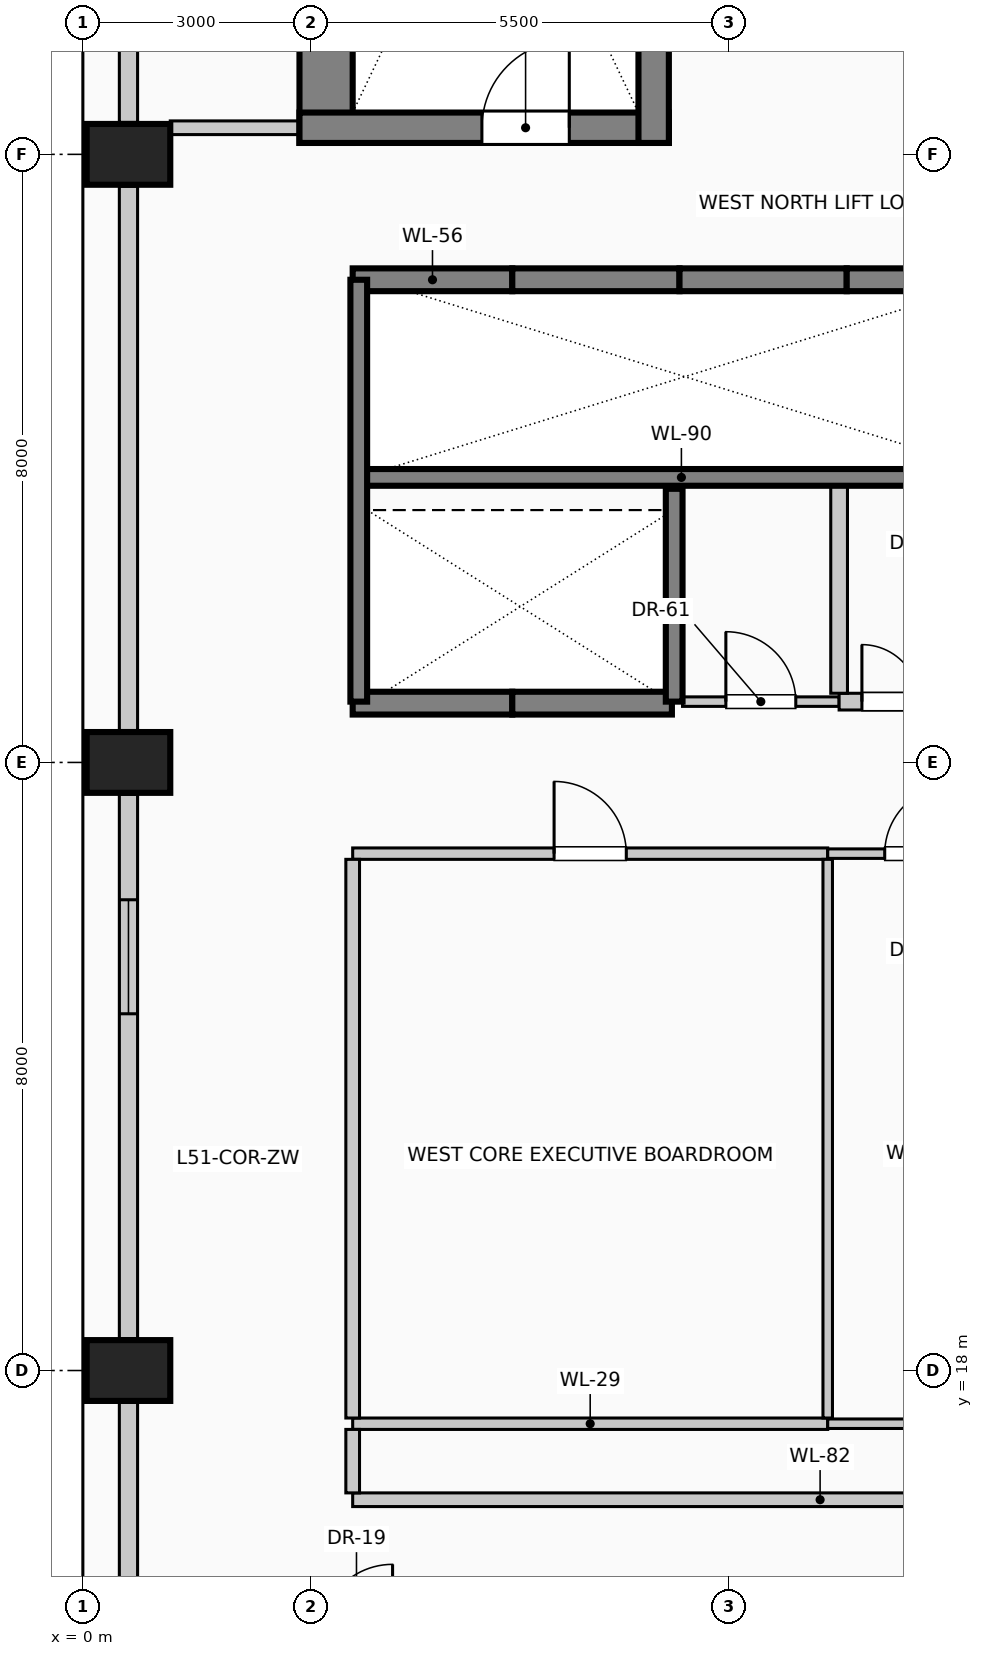
"""IFC4 building model, lengths in metres.
Left out: names, types, materials, properties, quantities, classifications, styles, units other than length and angle.
Written with IfcOpenShell. Run it as: python <this file> out.ifc"""

import sys

from ifc_helpers import new_model, si_unit, direction, frame, frame_2d, origin, origin_2d, place, context, subcontext, project, spatial, rectangle, extrude, element, fill, save


model = new_model("IFC4")
c1 = context("Model", 3, precision=1e-05, world=origin(), true_north=direction((0.0, 1.0)))
c2 = subcontext(c1, "Body", "Model", "MODEL_VIEW")
j1 = project(units=[si_unit("LENGTHUNIT", "METRE"), si_unit("PLANEANGLEUNIT", "RADIAN")], contexts=[c1])
p1 = place(None, origin())
s1 = spatial("IfcSite", under=j1, at=p1, CompositionType="ELEMENT")
p2 = place(p1, origin())
s2 = spatial("IfcBuilding", under=s1, at=p2, CompositionType="ELEMENT")
p3 = place(p2, frame((0.0, 0.0, 210.6)))
s3 = spatial("IfcBuildingStorey", under=s2, at=p3, CompositionType="ELEMENT", Elevation=210.6)
p4 = place(p3, frame((3.2, 34.15, 0.0), z_axis=(0.0, 0.0, 1.0), x_axis=(0.0, 1.0, 0.0)))
e1 = element("IfcWall", 1, at=p4, inside=s3, PredefinedType="SHEAR", context=c2, shape_type="SweptSolid", body=[
    extrude(rectangle(XDim=8.98, YDim=0.7, at=frame_2d((4.49, 0.0))), origin(), (0.0, 0.0, 1.0), 4.0),
])
p5 = place(p3, frame((2.85, 34.35, 0.0), z_axis=(0.0, 0.0, 1.0), x_axis=(1.0, 0.0, 0.0)))
e2 = element("IfcWall", 2, at=p5, inside=s3, PredefinedType="SHEAR", context=c2, shape_type="SweptSolid", body=[
    extrude(rectangle(XDim=4.86, YDim=0.4, at=frame_2d((2.43, 0.0))), origin(), (0.0, 0.0, 1.0), 4.0),
])
p6 = place(p5, frame((2.4, 0.0, 0.0)))
e3 = element("IfcOpeningElement", 3, at=p6, cuts=e2, PredefinedType="OPENING", context=c2, shape_type="SweptSolid", body=[
    extrude(rectangle(XDim=1.15, YDim=2.2, at=frame_2d((0.575, 1.1))), frame((0.0, 0.21, 0.0), z_axis=(0.0, -1.0, 0.0), x_axis=(1.0, 0.0, 0.0)), (0.0, 0.0, 1.0), 0.42),
])
p7 = place(p3, frame((7.51, 34.15, 0.0), z_axis=(0.0, 0.0, 1.0), x_axis=(0.0, 1.0, 0.0)))
e4 = element("IfcWall", 4, at=p7, inside=s3, PredefinedType="SHEAR", context=c2, shape_type="SweptSolid", body=[
    extrude(rectangle(XDim=8.98, YDim=0.4, at=frame_2d((4.49, 0.0))), origin(), (0.0, 0.0, 1.0), 4.0),
])
for number, where, z_axis, x_axis in (
    (5, (0.6, 18.0, 0.0), (0.0, 0.0, 1.0), (0.0, 1.0, 0.0)),
    (6, (0.6, 26.0, 0.0), (0.0, 0.0, 1.0), (0.0, 1.0, 0.0)),
    (7, (0.6, 34.0, 0.0), (0.0, 0.0, 1.0), (0.0, 1.0, 0.0)),
):
    element("IfcColumn", number, at=place(p3, frame(where, z_axis=z_axis, x_axis=x_axis)), inside=s3, PredefinedType="COLUMN", context=c2, shape_type="SweptSolid", body=[
        extrude(rectangle(XDim=0.8, YDim=1.1, at=origin_2d()), origin(), (0.0, 0.0, 1.0), 4.0),
    ])
p8 = place(p3, frame((0.6, 10.42, 0.0), z_axis=(0.0, 0.0, 1.0), x_axis=(0.0, 1.0, 0.0)))
e8 = element("IfcWall", 8, at=p8, inside=s3, PredefinedType="SOLIDWALL", context=c2, shape_type="SweptSolid", body=[
    extrude(rectangle(XDim=7.16, YDim=0.24, at=frame_2d((3.58, 0.0))), origin(), (0.0, 0.0, 1.0), 3.0),
])
p9 = place(p8, frame((1.387, 0.0, 0.42)))
e9 = element("IfcOpeningElement", 9, at=p9, cuts=e8, PredefinedType="OPENING", context=c2, shape_type="SweptSolid", body=[
    extrude(rectangle(XDim=1.5, YDim=2.2, at=frame_2d((0.75, 1.1))), frame((0.0, 0.13, 0.0), z_axis=(0.0, -1.0, 0.0), x_axis=(1.0, 0.0, 0.0)), (0.0, 0.0, 1.0), 0.26),
])
p10 = place(p3, frame((0.6, 18.42, 0.0), z_axis=(0.0, 0.0, 1.0), x_axis=(0.0, 1.0, 0.0)))
e10 = element("IfcWall", 10, at=p10, inside=s3, PredefinedType="SOLIDWALL", context=c2, shape_type="SweptSolid", body=[
    extrude(rectangle(XDim=7.16, YDim=0.24, at=frame_2d((3.58, 0.0))), origin(), (0.0, 0.0, 1.0), 3.0),
])
p11 = place(p10, frame((4.273, 0.0, 0.42)))
e11 = element("IfcOpeningElement", 11, at=p11, cuts=e10, PredefinedType="OPENING", context=c2, shape_type="SweptSolid", body=[
    extrude(rectangle(XDim=1.5, YDim=2.2, at=frame_2d((0.75, 1.1))), frame((0.0, 0.13, 0.0), z_axis=(0.0, -1.0, 0.0), x_axis=(1.0, 0.0, 0.0)), (0.0, 0.0, 1.0), 0.26),
])
p12 = place(p3, frame((0.6, 26.42, 0.0), z_axis=(0.0, 0.0, 1.0), x_axis=(0.0, 1.0, 0.0)))
e12 = element("IfcWall", 12, at=p12, inside=s3, PredefinedType="SOLIDWALL", context=c2, shape_type="SweptSolid", body=[
    extrude(rectangle(XDim=7.16, YDim=0.24, at=frame_2d((3.58, 0.0))), origin(), (0.0, 0.0, 1.0), 3.0),
])
p13 = place(p3, frame((0.6, 34.42, 0.0), z_axis=(0.0, 0.0, 1.0), x_axis=(0.0, 1.0, 0.0)))
e13 = element("IfcWall", 13, at=p13, inside=s3, PredefinedType="SOLIDWALL", context=c2, shape_type="SweptSolid", body=[
    extrude(rectangle(XDim=7.56, YDim=0.24, at=frame_2d((3.78, 0.0))), origin(), (0.0, 0.0, 1.0), 3.0),
])
p14 = place(p3, frame((3.55, 32.35, 0.0), z_axis=(0.0, 0.0, 1.0), x_axis=(1.0, 0.0, 0.0)))
e14 = element("IfcWall", 14, at=p14, inside=s3, PredefinedType="SOLIDWALL", context=c2, shape_type="SweptSolid", body=[
    extrude(rectangle(XDim=2.1, YDim=0.3, at=frame_2d((1.05, 0.0))), origin(), (0.0, 0.0, 1.0), 4.0),
])
p15 = place(p3, frame((5.65, 32.35, 0.0), z_axis=(0.0, 0.0, 1.0), x_axis=(1.0, 0.0, 0.0)))
e15 = element("IfcWall", 15, at=p15, inside=s3, PredefinedType="SOLIDWALL", context=c2, shape_type="SweptSolid", body=[
    extrude(rectangle(XDim=2.2, YDim=0.3, at=frame_2d((1.1, 0.0))), origin(), (0.0, 0.0, 1.0), 4.0),
])
p16 = place(p3, frame((7.85, 32.35, 0.0), z_axis=(0.0, 0.0, 1.0), x_axis=(1.0, 0.0, 0.0)))
e16 = element("IfcWall", 16, at=p16, inside=s3, PredefinedType="SOLIDWALL", context=c2, shape_type="SweptSolid", body=[
    extrude(rectangle(XDim=2.2, YDim=0.3, at=frame_2d((1.1, 0.0))), origin(), (0.0, 0.0, 1.0), 4.0),
])
p17 = place(p3, frame((10.05, 32.35, 0.0), z_axis=(0.0, 0.0, 1.0), x_axis=(1.0, 0.0, 0.0)))
e17 = element("IfcWall", 17, at=p17, inside=s3, PredefinedType="SOLIDWALL", context=c2, shape_type="SweptSolid", body=[
    extrude(rectangle(XDim=2.15, YDim=0.3, at=frame_2d((1.075, 0.0))), origin(), (0.0, 0.0, 1.0), 4.0),
])
p18 = place(p3, frame((5.65, 26.78, 0.0), z_axis=(0.0, 0.0, 1.0), x_axis=(-1.0, 0.0, 0.0)))
e18 = element("IfcWall", 18, at=p18, inside=s3, PredefinedType="SOLIDWALL", context=c2, shape_type="SweptSolid", body=[
    extrude(rectangle(XDim=2.1, YDim=0.3, at=frame_2d((1.05, 0.0))), origin(), (0.0, 0.0, 1.0), 4.0),
])
p19 = place(p3, frame((7.75, 26.78, 0.0), z_axis=(0.0, 0.0, 1.0), x_axis=(-1.0, 0.0, 0.0)))
e19 = element("IfcWall", 19, at=p19, inside=s3, PredefinedType="SOLIDWALL", context=c2, shape_type="SweptSolid", body=[
    extrude(rectangle(XDim=2.1, YDim=0.3, at=frame_2d((1.05, 0.0))), origin(), (0.0, 0.0, 1.0), 4.0),
])
p20 = place(p3, frame((3.55, 29.75, 0.0), z_axis=(0.0, 0.0, 1.0), x_axis=(1.0, 0.0, 0.0)))
e20 = element("IfcWall", 20, at=p20, inside=s3, PredefinedType="SOLIDWALL", context=c2, shape_type="SweptSolid", body=[
    extrude(rectangle(XDim=8.65, YDim=0.22, at=frame_2d((4.325, 0.0))), origin(), (0.0, 0.0, 1.0), 4.0),
])
p21 = place(p3, frame((3.63, 26.8, 0.0), z_axis=(0.0, 0.0, 1.0), x_axis=(0.0, 1.0, 0.0)))
e21 = element("IfcWall", 21, at=p21, inside=s3, PredefinedType="SOLIDWALL", context=c2, shape_type="SweptSolid", body=[
    extrude(rectangle(XDim=5.55, YDim=0.22, at=frame_2d((2.775, 0.0))), origin(), (0.0, 0.0, 1.0), 4.0),
])
p22 = place(p3, frame((7.78, 26.8, 0.0), z_axis=(0.0, 0.0, 1.0), x_axis=(0.0, 1.0, 0.0)))
e22 = element("IfcWall", 22, at=p22, inside=s3, PredefinedType="SOLIDWALL", context=c2, shape_type="SweptSolid", body=[
    extrude(rectangle(XDim=2.8, YDim=0.22, at=frame_2d((1.4, 0.0))), origin(), (0.0, 0.0, 1.0), 4.0),
])
p23 = place(p3, frame((3.55, 16.3, 0.0), z_axis=(0.0, 0.0, 1.0), x_axis=(1.0, 0.0, 0.0)))
e23 = element("IfcWall", 23, at=p23, inside=s3, PredefinedType="PARTITIONING", context=c2, shape_type="SweptSolid", body=[
    extrude(rectangle(XDim=12.3, YDim=0.18, at=frame_2d((6.15, 0.0))), origin(), (0.0, 0.0, 1.0), 3.75),
])
p24 = place(p3, frame((3.55, 17.3, 0.0), z_axis=(0.0, 0.0, 1.0), x_axis=(1.0, 0.0, 0.0)))
e24 = element("IfcWall", 24, at=p24, inside=s3, PredefinedType="PARTITIONING", context=c2, shape_type="SweptSolid", body=[
    extrude(rectangle(XDim=6.25, YDim=0.15, at=frame_2d((3.125, 0.0))), origin(), (0.0, 0.0, 1.0), 3.75),
])
p25 = place(p3, frame((9.8, 17.3, 0.0), z_axis=(0.0, 0.0, 1.0), x_axis=(1.0, 0.0, 0.0)))
e25 = element("IfcWall", 25, at=p25, inside=s3, PredefinedType="PARTITIONING", context=c2, shape_type="SweptSolid", body=[
    extrude(rectangle(XDim=6.05, YDim=0.125, at=frame_2d((3.025, 0.0))), origin(), (0.0, 0.0, 1.0), 3.75),
])
p26 = place(p3, frame((3.55, 24.8, 0.0), z_axis=(0.0, 0.0, 1.0), x_axis=(1.0, 0.0, 0.0)))
e26 = element("IfcWall", 26, at=p26, inside=s3, PredefinedType="PARTITIONING", context=c2, shape_type="SweptSolid", body=[
    extrude(rectangle(XDim=6.25, YDim=0.15, at=frame_2d((3.125, 0.0))), origin(), (0.0, 0.0, 1.0), 3.75),
])
p27 = place(p26, frame((2.65, 0.0, 0.0)))
e27 = element("IfcOpeningElement", 27, at=p27, cuts=e26, PredefinedType="OPENING", context=c2, shape_type="SweptSolid", body=[
    extrude(rectangle(XDim=0.95, YDim=2.15, at=frame_2d((0.475, 1.075))), frame((0.0, 0.085, 0.0), z_axis=(0.0, -1.0, 0.0), x_axis=(1.0, 0.0, 0.0)), (0.0, 0.0, 1.0), 0.17),
])
p28 = place(p3, frame((9.8, 24.8, 0.0), z_axis=(0.0, 0.0, 1.0), x_axis=(1.0, 0.0, 0.0)))
e28 = element("IfcWall", 28, at=p28, inside=s3, PredefinedType="PARTITIONING", context=c2, shape_type="SweptSolid", body=[
    extrude(rectangle(XDim=2.4, YDim=0.125, at=frame_2d((1.2, 0.0))), origin(), (0.0, 0.0, 1.0), 3.75),
])
p29 = place(p28, frame((0.75, 0.0, 0.0)))
e29 = element("IfcOpeningElement", 29, at=p29, cuts=e28, PredefinedType="OPENING", context=c2, shape_type="SweptSolid", body=[
    extrude(rectangle(XDim=0.9, YDim=2.1, at=frame_2d((0.45, 1.05))), frame((0.0, 0.073, 0.0), z_axis=(0.0, -1.0, 0.0), x_axis=(1.0, 0.0, 0.0)), (0.0, 0.0, 1.0), 0.145),
])
p30 = place(p3, frame((7.89, 26.8, 0.0), z_axis=(0.0, 0.0, 1.0), x_axis=(1.0, 0.0, 0.0)))
e30 = element("IfcWall", 30, at=p30, inside=s3, PredefinedType="PARTITIONING", context=c2, shape_type="SweptSolid", body=[
    extrude(rectangle(XDim=2.06, YDim=0.125, at=frame_2d((1.03, 0.0))), origin(), (0.0, 0.0, 1.0), 3.75),
])
p31 = place(p30, frame((0.57, 0.0, 0.0)))
e31 = element("IfcOpeningElement", 31, at=p31, cuts=e30, PredefinedType="OPENING", context=c2, shape_type="SweptSolid", body=[
    extrude(rectangle(XDim=0.92, YDim=2.1, at=frame_2d((0.46, 1.05))), frame((0.0, 0.073, 0.0), z_axis=(0.0, -1.0, 0.0), x_axis=(1.0, 0.0, 0.0)), (0.0, 0.0, 1.0), 0.145),
])
p32 = place(p3, frame((9.95, 26.8, 0.0), z_axis=(0.0, 0.0, 1.0), x_axis=(1.0, 0.0, 0.0)))
e32 = element("IfcWall", 32, at=p32, inside=s3, PredefinedType="PARTITIONING", context=c2, shape_type="SweptSolid", body=[
    extrude(rectangle(XDim=2.1, YDim=0.22, at=frame_2d((1.05, 0.0))), origin(), (0.0, 0.0, 1.0), 3.75),
])
p33 = place(p32, frame((0.3, 0.0, 0.0)))
e33 = element("IfcOpeningElement", 33, at=p33, cuts=e32, PredefinedType="OPENING", context=c2, shape_type="SweptSolid", body=[
    extrude(rectangle(XDim=1.5, YDim=2.25, at=frame_2d((0.75, 1.125))), frame((0.0, 0.12, 0.0), z_axis=(0.0, -1.0, 0.0), x_axis=(1.0, 0.0, 0.0)), (0.0, 0.0, 1.0), 0.24),
])
p34 = place(p3, frame((1.15, 34.35, 0.0), z_axis=(0.0, 0.0, 1.0), x_axis=(1.0, 0.0, 0.0)))
e34 = element("IfcWall", 34, at=p34, inside=s3, PredefinedType="PARTITIONING", context=c2, shape_type="SweptSolid", body=[
    extrude(rectangle(XDim=1.7, YDim=0.18, at=frame_2d((0.85, 0.0))), origin(), (0.0, 0.0, 1.0), 3.75),
])
p35 = place(p3, frame((3.55, 16.39, 0.0), z_axis=(0.0, 0.0, 1.0), x_axis=(0.0, 1.0, 0.0)))
e35 = element("IfcWall", 35, at=p35, inside=s3, PredefinedType="PARTITIONING", context=c2, shape_type="SweptSolid", body=[
    extrude(rectangle(XDim=0.835, YDim=0.18, at=frame_2d((0.417, 0.0))), origin(), (0.0, 0.0, 1.0), 3.75),
])
p36 = place(p3, frame((3.55, 17.375, 0.0), z_axis=(0.0, 0.0, 1.0), x_axis=(0.0, 1.0, 0.0)))
e36 = element("IfcWall", 36, at=p36, inside=s3, PredefinedType="PARTITIONING", context=c2, shape_type="SweptSolid", body=[
    extrude(rectangle(XDim=7.35, YDim=0.18, at=frame_2d((3.675, 0.0))), origin(), (0.0, 0.0, 1.0), 3.75),
])
p37 = place(p3, frame((9.8, 17.375, 0.0), z_axis=(0.0, 0.0, 1.0), x_axis=(0.0, 1.0, 0.0)))
e37 = element("IfcWall", 37, at=p37, inside=s3, PredefinedType="PARTITIONING", context=c2, shape_type="SweptSolid", body=[
    extrude(rectangle(XDim=7.35, YDim=0.125, at=frame_2d((3.675, 0.0))), origin(), (0.0, 0.0, 1.0), 3.75),
])
p38 = place(p3, frame((9.95, 26.91, 0.0), z_axis=(0.0, 0.0, 1.0), x_axis=(0.0, 1.0, 0.0)))
e38 = element("IfcWall", 38, at=p38, inside=s3, PredefinedType="PARTITIONING", context=c2, shape_type="SweptSolid", body=[
    extrude(rectangle(XDim=2.73, YDim=0.22, at=frame_2d((1.365, 0.0))), origin(), (0.0, 0.0, 1.0), 3.75),
])
p39 = place(p11, origin())
e39 = element("IfcWindow", 39, at=p39, inside=s3, PartitioningType="SINGLE_PANEL", PredefinedType="WINDOW", context=c2, shape_type="SweptSolid", body=[
    extrude(rectangle(XDim=1.5, YDim=2.2, at=frame_2d((0.75, 1.1))), frame((0.0, 0.03, 0.0), z_axis=(0.0, -1.0, 0.0), x_axis=(1.0, 0.0, 0.0)), (0.0, 0.0, 1.0), 0.06),
])
fill(e11, e39)
p40 = place(p6, origin())
e40 = element("IfcDoor", 40, at=p40, inside=s3, OperationType="SINGLE_SWING_RIGHT", PredefinedType="DOOR", context=c2, shape_type="SweptSolid", body=[
    extrude(rectangle(XDim=1.15, YDim=2.2, at=frame_2d((0.575, 1.1))), frame((0.0, 0.025, 0.0), z_axis=(0.0, -1.0, 0.0), x_axis=(1.0, 0.0, 0.0)), (0.0, 0.0, 1.0), 0.05),
])
fill(e3, e40)
p41 = place(p27, origin())
e41 = element("IfcDoor", 41, at=p41, inside=s3, OperationType="SINGLE_SWING_LEFT", PredefinedType="DOOR", context=c2, shape_type="SweptSolid", body=[
    extrude(rectangle(XDim=0.95, YDim=2.15, at=frame_2d((0.475, 1.075))), frame((0.0, 0.025, 0.0), z_axis=(0.0, -1.0, 0.0), x_axis=(1.0, 0.0, 0.0)), (0.0, 0.0, 1.0), 0.05),
])
fill(e27, e41)
p42 = place(p29, origin())
e42 = element("IfcDoor", 42, at=p42, inside=s3, OperationType="SINGLE_SWING_RIGHT", PredefinedType="DOOR", context=c2, shape_type="SweptSolid", body=[
    extrude(rectangle(XDim=0.9, YDim=2.1, at=frame_2d((0.45, 1.05))), frame((0.0, 0.025, 0.0), z_axis=(0.0, -1.0, 0.0), x_axis=(1.0, 0.0, 0.0)), (0.0, 0.0, 1.0), 0.05),
])
fill(e29, e42)
p43 = place(p31, origin())
e43 = element("IfcDoor", 43, at=p43, inside=s3, OperationType="SINGLE_SWING_LEFT", PredefinedType="DOOR", context=c2, shape_type="SweptSolid", body=[
    extrude(rectangle(XDim=0.92, YDim=2.1, at=frame_2d((0.46, 1.05))), frame((0.0, 0.025, 0.0), z_axis=(0.0, -1.0, 0.0), x_axis=(1.0, 0.0, 0.0)), (0.0, 0.0, 1.0), 0.05),
])
fill(e31, e43)
p44 = place(p33, origin())
e44 = element("IfcDoor", 44, at=p44, inside=s3, OperationType="DOUBLE_DOOR_SINGLE_SWING", PredefinedType="DOOR", context=c2, shape_type="SweptSolid", body=[
    extrude(rectangle(XDim=1.5, YDim=2.25, at=frame_2d((0.75, 1.125))), frame((0.0, 0.025, 0.0), z_axis=(0.0, -1.0, 0.0), x_axis=(1.0, 0.0, 0.0)), (0.0, 0.0, 1.0), 0.05),
])
fill(e33, e44)
save(model, sys.argv[1])
